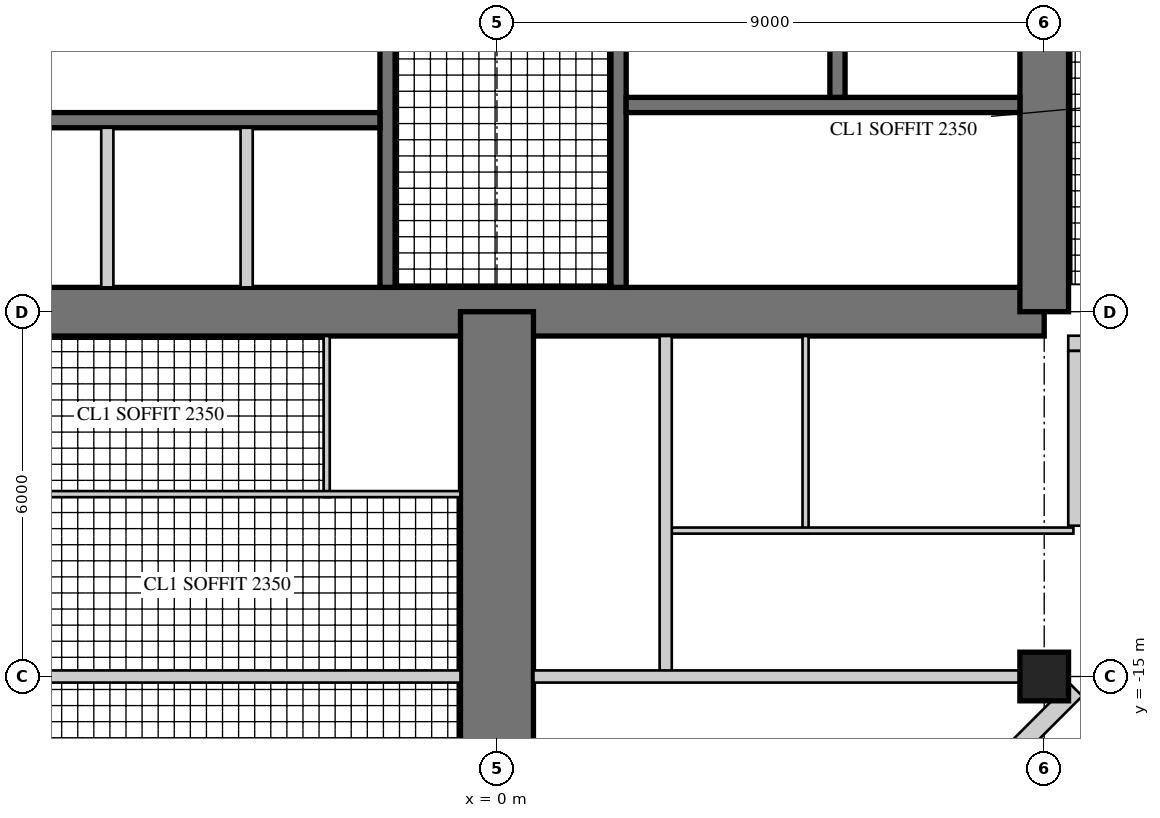
"""IFC4 building model, lengths in metres.
Left out: names, types, materials, properties, quantities, classifications, styles, units other than length and angle.
Written with IfcOpenShell. Run it as: python <this file> out.ifc"""

import sys

from ifc_helpers import new_model, si_unit, direction, frame, frame_2d, origin, origin_2d, place, context, subcontext, project, spatial, rectangle, hollow_rectangle, extrude, element, fill, save


model = new_model("IFC4")
c1 = context("Model", 3, precision=1e-05, world=origin(), true_north=direction((0.0, 1.0)))
c2 = subcontext(c1, "Body", "Model", "MODEL_VIEW")
j1 = project(units=[si_unit("LENGTHUNIT", "METRE"), si_unit("PLANEANGLEUNIT", "RADIAN")], contexts=[c1])
p1 = place(None, origin())
s1 = spatial("IfcSite", under=j1, at=p1, CompositionType="ELEMENT")
p2 = place(p1, origin())
s2 = spatial("IfcBuilding", under=s1, at=p2, CompositionType="ELEMENT")
p3 = place(p2, frame((0.0, 0.0, 235.7)))
s3 = spatial("IfcBuildingStorey", under=s2, at=p3, CompositionType="ELEMENT", Elevation=235.7)
p4 = place(p3, frame((-9.0, -9.0, 0.0), z_axis=(0.0, 0.0, 1.0), x_axis=(1.0, 0.0, 0.0)))
e1 = element("IfcWall", 1, at=p4, inside=s3, PredefinedType="SHEAR", context=c2, shape_type="SweptSolid", body=[
    extrude(rectangle(XDim=18.0, YDim=0.8, at=frame_2d((9.0, 0.0))), origin(), (0.0, 0.0, 1.0), 3.4),
])
p5 = place(p4, frame((9.8, 0.0, 0.0)))
e2 = element("IfcOpeningElement", 2, at=p5, cuts=e1, PredefinedType="OPENING", context=c2, shape_type="SweptSolid", body=[
    extrude(rectangle(XDim=1.0, YDim=2.4, at=frame_2d((0.5, 1.2))), frame((0.0, 0.41, 0.0), z_axis=(0.0, -1.0, 0.0), x_axis=(1.0, 0.0, 0.0)), (0.0, 0.0, 1.0), 0.82),
])
p6 = place(p3, frame((9.0, -9.0, 0.0), z_axis=(0.0, 0.0, 1.0), x_axis=(0.0, 1.0, 0.0)))
e3 = element("IfcWall", 3, at=p6, inside=s3, PredefinedType="SHEAR", context=c2, shape_type="SweptSolid", body=[
    extrude(rectangle(XDim=18.0, YDim=0.8, at=frame_2d((9.0, 0.0))), origin(), (0.0, 0.0, 1.0), 3.4),
])
p7 = place(p6, frame((9.8, 0.0, 0.0)))
e4 = element("IfcOpeningElement", 4, at=p7, cuts=e3, PredefinedType="OPENING", context=c2, shape_type="SweptSolid", body=[
    extrude(rectangle(XDim=1.0, YDim=2.4, at=frame_2d((0.5, 1.2))), frame((0.0, 0.41, 0.0), z_axis=(0.0, -1.0, 0.0), x_axis=(1.0, 0.0, 0.0)), (0.0, 0.0, 1.0), 0.82),
])
p8 = place(p3, frame((-1.8, -1.875, 0.0), z_axis=(0.0, 0.0, 1.0), x_axis=(0.0, -1.0, 0.0)))
e5 = element("IfcWall", 5, at=p8, inside=s3, PredefinedType="SHEAR", context=c2, shape_type="SweptSolid", body=[
    extrude(rectangle(XDim=6.725, YDim=0.25, at=frame_2d((3.363, 0.0))), origin(), (0.0, 0.0, 1.0), 3.4),
])
p9 = place(p8, frame((1.875, 0.0, 0.0)))
e6 = element("IfcOpeningElement", 6, at=p9, cuts=e5, PredefinedType="OPENING", context=c2, shape_type="SweptSolid", body=[
    extrude(rectangle(XDim=1.6, YDim=2.4, at=frame_2d((0.8, 1.2))), frame((0.0, 0.135, 0.0), z_axis=(0.0, -1.0, 0.0), x_axis=(1.0, 0.0, 0.0)), (0.0, 0.0, 1.0), 0.27),
])
p10 = place(p3, frame((-1.925, -5.85, 0.0), z_axis=(0.0, 0.0, 1.0), x_axis=(-1.0, 0.0, 0.0)))
e7 = element("IfcWall", 7, at=p10, inside=s3, PredefinedType="SHEAR", context=c2, shape_type="SweptSolid", body=[
    extrude(rectangle(XDim=6.675, YDim=0.25, at=frame_2d((3.337, 0.0))), origin(), (0.0, 0.0, 1.0), 3.4),
])
p11 = place(p10, frame((0.496, 0.0, 0.0)))
e8 = element("IfcOpeningElement", 8, at=p11, cuts=e7, PredefinedType="OPENING", context=c2, shape_type="SweptSolid", body=[
    extrude(rectangle(XDim=1.1, YDim=2.2, at=frame_2d((0.55, 1.1))), frame((0.0, 0.135, 0.0), z_axis=(0.0, -1.0, 0.0), x_axis=(1.0, 0.0, 0.0)), (0.0, 0.0, 1.0), 0.27),
])
p12 = place(p10, frame((2.788, 0.0, 0.0)))
e9 = element("IfcOpeningElement", 9, at=p12, cuts=e7, PredefinedType="OPENING", context=c2, shape_type="SweptSolid", body=[
    extrude(rectangle(XDim=1.1, YDim=2.2, at=frame_2d((0.55, 1.1))), frame((0.0, 0.135, 0.0), z_axis=(0.0, -1.0, 0.0), x_axis=(1.0, 0.0, 0.0)), (0.0, 0.0, 1.0), 0.27),
])
p13 = place(p10, frame((5.079, 0.0, 0.0)))
e10 = element("IfcOpeningElement", 10, at=p13, cuts=e7, PredefinedType="OPENING", context=c2, shape_type="SweptSolid", body=[
    extrude(rectangle(XDim=1.1, YDim=2.2, at=frame_2d((0.55, 1.1))), frame((0.0, 0.135, 0.0), z_axis=(0.0, -1.0, 0.0), x_axis=(1.0, 0.0, 0.0)), (0.0, 0.0, 1.0), 0.27),
])
for number, where, z_axis, x_axis in (
    (11, (-4.117, -5.975, 0.0), (0.0, 0.0, 1.0), (0.0, -1.0, 0.0)),
    (12, (-6.408, -5.975, 0.0), (0.0, 0.0, 1.0), (0.0, -1.0, 0.0)),
):
    element("IfcWall", number, at=place(p3, frame(where, z_axis=z_axis, x_axis=x_axis)), inside=s3, PredefinedType="PARTITIONING", context=c2, shape_type="SweptSolid", body=[
        extrude(rectangle(XDim=2.625, YDim=0.2, at=frame_2d((1.312, 0.0))), origin(), (0.0, 0.0, 1.0), 3.4),
    ])
p14 = place(p3, frame((2.0, -1.675, 0.0), z_axis=(0.0, 0.0, 1.0), x_axis=(0.0, -1.0, 0.0)))
e13 = element("IfcWall", 13, at=p14, inside=s3, PredefinedType="SHEAR", context=c2, shape_type="SweptSolid", body=[
    extrude(rectangle(XDim=6.925, YDim=0.25, at=frame_2d((3.462, 0.0))), origin(), (0.0, 0.0, 1.0), 3.4),
])
p15 = place(p14, frame((0.725, 0.0, 0.0)))
e14 = element("IfcOpeningElement", 14, at=p15, cuts=e13, PredefinedType="OPENING", context=c2, shape_type="SweptSolid", body=[
    extrude(rectangle(XDim=1.0, YDim=2.1, at=frame_2d((0.5, 1.05))), frame((0.0, 0.135, 0.0), z_axis=(0.0, -1.0, 0.0), x_axis=(1.0, 0.0, 0.0)), (0.0, 0.0, 1.0), 0.27),
])
p16 = place(p3, frame((2.125, -5.6, 0.0), z_axis=(0.0, 0.0, 1.0), x_axis=(1.0, 0.0, 0.0)))
e15 = element("IfcWall", 15, at=p16, inside=s3, PredefinedType="SHEAR", context=c2, shape_type="SweptSolid", body=[
    extrude(rectangle(XDim=6.475, YDim=0.25, at=frame_2d((3.238, 0.0))), origin(), (0.0, 0.0, 1.0), 3.4),
])
p17 = place(p16, frame((0.175, 0.0, 0.0)))
e16 = element("IfcOpeningElement", 16, at=p17, cuts=e15, PredefinedType="OPENING", context=c2, shape_type="SweptSolid", body=[
    extrude(rectangle(XDim=1.0, YDim=2.1, at=frame_2d((0.5, 1.05))), frame((0.0, 0.135, 0.0), z_axis=(0.0, -1.0, 0.0), x_axis=(1.0, 0.0, 0.0)), (0.0, 0.0, 1.0), 0.27),
])
p18 = place(p3, frame((5.6, -1.925, 0.0), z_axis=(0.0, 0.0, 1.0), x_axis=(0.0, -1.0, 0.0)))
e17 = element("IfcWall", 17, at=p18, inside=s3, PredefinedType="SHEAR", context=c2, shape_type="SweptSolid", body=[
    extrude(rectangle(XDim=3.55, YDim=0.25, at=frame_2d((1.775, 0.0))), origin(), (0.0, 0.0, 1.0), 3.4),
])
p19 = place(p18, frame((1.525, 0.0, 0.0)))
e18 = element("IfcOpeningElement", 18, at=p19, cuts=e17, PredefinedType="OPENING", context=c2, shape_type="SweptSolid", body=[
    extrude(rectangle(XDim=1.1, YDim=2.2, at=frame_2d((0.55, 1.1))), frame((0.0, 0.135, 0.0), z_axis=(0.0, -1.0, 0.0), x_axis=(1.0, 0.0, 0.0)), (0.0, 0.0, 1.0), 0.27),
])
p20 = place(p18, frame((0.075, 0.0, 0.0)))
e19 = element("IfcOpeningElement", 19, at=p20, cuts=e17, PredefinedType="OPENING", context=c2, shape_type="SweptSolid", body=[
    extrude(rectangle(XDim=0.8, YDim=2.1, at=frame_2d((0.4, 1.05))), frame((0.0, 0.135, 0.0), z_axis=(0.0, -1.0, 0.0), x_axis=(1.0, 0.0, 0.0)), (0.0, 0.0, 1.0), 0.27),
])
p21 = place(p3, frame((0.0, -9.0, 0.0), z_axis=(0.0, 0.0, 1.0), x_axis=(0.0, -1.0, 0.0)))
e20 = element("IfcWall", 20, at=p21, inside=s3, PredefinedType="SHEAR", context=c2, shape_type="SweptSolid", body=[
    extrude(rectangle(XDim=9.0, YDim=1.2, at=frame_2d((4.5, 0.0))), origin(), (0.0, 0.0, 1.0), 3.4),
])
p22 = place(p21, frame((3.8, 0.0, 0.0)))
e21 = element("IfcOpeningElement", 21, at=p22, cuts=e20, PredefinedType="OPENING", context=c2, shape_type="SweptSolid", body=[
    extrude(rectangle(XDim=1.0, YDim=2.15, at=frame_2d((0.5, 1.075))), frame((0.0, 0.61, 0.0), z_axis=(0.0, -1.0, 0.0), x_axis=(1.0, 0.0, 0.0)), (0.0, 0.0, 1.0), 1.22),
])
p23 = place(p21, frame((7.0, 0.0, 0.0)))
e22 = element("IfcOpeningElement", 22, at=p23, cuts=e20, PredefinedType="OPENING", context=c2, shape_type="SweptSolid", body=[
    extrude(rectangle(XDim=1.0, YDim=2.2, at=frame_2d((0.5, 1.1))), frame((0.0, 0.61, 0.0), z_axis=(0.0, -1.0, 0.0), x_axis=(1.0, 0.0, 0.0)), (0.0, 0.0, 1.0), 1.22),
])
p24 = place(p3, frame((9.0, -15.0, 0.0), z_axis=(0.0, 0.0, 1.0), x_axis=(1.0, 0.0, 0.0)))
e23 = element("IfcColumn", 23, at=p24, inside=s3, PredefinedType="COLUMN", context=c2, shape_type="SweptSolid", body=[
    extrude(rectangle(XDim=0.8, YDim=0.8, at=origin_2d()), origin(), (0.0, 0.0, 1.0), 3.4),
])
p25 = place(p3, frame((9.395, -9.52, 0.0), z_axis=(0.0, 0.0, 1.0), x_axis=(1.0, 0.0, 0.0)))
e24 = element("IfcWall", 24, at=p25, inside=s3, PredefinedType="SOLIDWALL", context=c2, shape_type="SweptSolid", body=[
    extrude(rectangle(XDim=3.125, YDim=0.25, at=frame_2d((1.562, 0.0))), origin(), (0.0, 0.0, 1.0), 3.22),
])
p26 = place(p25, frame((0.6, 0.0, 0.0)))
e25 = element("IfcOpeningElement", 25, at=p26, cuts=e24, PredefinedType="OPENING", context=c2, shape_type="SweptSolid", body=[
    extrude(rectangle(XDim=1.0, YDim=2.2, at=frame_2d((0.5, 1.1))), frame((0.0, 0.135, 0.0), z_axis=(0.0, -1.0, 0.0), x_axis=(1.0, 0.0, 0.0)), (0.0, 0.0, 1.0), 0.27),
])
p27 = place(p3, frame((-9.52, -15.215, 0.0), z_axis=(0.0, 0.0, 1.0), x_axis=(0.707106781187, -0.707106781187, 0.0)))
e26 = element("IfcWall", 26, at=p27, inside=s3, PredefinedType="SOLIDWALL", context=c2, shape_type="SweptSolid", body=[
    extrude(rectangle(XDim=4.674, YDim=0.3, at=frame_2d((2.337, 0.0))), origin(), (0.0, 0.0, 1.0), 3.22),
])
p28 = place(p27, frame((1.887, 0.0, 0.3)))
e27 = element("IfcOpeningElement", 27, at=p28, cuts=e26, PredefinedType="OPENING", context=c2, shape_type="SweptSolid", body=[
    extrude(rectangle(XDim=0.9, YDim=2.4, at=frame_2d((0.45, 1.2))), frame((0.0, 0.16, 0.0), z_axis=(0.0, -1.0, 0.0), x_axis=(1.0, 0.0, 0.0)), (0.0, 0.0, 1.0), 0.32),
])
p29 = place(p3, frame((6.215, -18.52, 0.0), z_axis=(0.0, 0.0, 1.0), x_axis=(0.707106781187, 0.707106781187, 0.0)))
e28 = element("IfcWall", 28, at=p29, inside=s3, PredefinedType="SOLIDWALL", context=c2, shape_type="SweptSolid", body=[
    extrude(rectangle(XDim=4.674, YDim=0.3, at=frame_2d((2.337, 0.0))), origin(), (0.0, 0.0, 1.0), 3.22),
])
p30 = place(p29, frame((1.887, 0.0, 0.3)))
e29 = element("IfcOpeningElement", 29, at=p30, cuts=e28, PredefinedType="OPENING", context=c2, shape_type="SweptSolid", body=[
    extrude(rectangle(XDim=0.9, YDim=2.4, at=frame_2d((0.45, 1.2))), frame((0.0, 0.16, 0.0), z_axis=(0.0, -1.0, 0.0), x_axis=(1.0, 0.0, 0.0)), (0.0, 0.0, 1.0), 0.32),
])
p31 = place(p3, frame((9.52, -12.52, 0.0), z_axis=(0.0, 0.0, 1.0), x_axis=(0.0, 1.0, 0.0)))
e30 = element("IfcWall", 30, at=p31, inside=s3, PredefinedType="SOLIDWALL", context=c2, shape_type="SweptSolid", body=[
    extrude(rectangle(XDim=2.875, YDim=0.25, at=frame_2d((1.438, 0.0))), origin(), (0.0, 0.0, 1.0), 3.22),
])
p32 = place(p31, frame((0.6, 0.0, 0.0)))
e31 = element("IfcOpeningElement", 31, at=p32, cuts=e30, PredefinedType="OPENING", context=c2, shape_type="SweptSolid", body=[
    extrude(rectangle(XDim=1.0, YDim=2.2, at=frame_2d((0.5, 1.1))), frame((0.0, 0.135, 0.0), z_axis=(0.0, -1.0, 0.0), x_axis=(1.0, 0.0, 0.0)), (0.0, 0.0, 1.0), 0.27),
])
p33 = place(p3, frame((5.075, -9.4, 0.0), z_axis=(0.0, 0.0, 1.0), x_axis=(0.0, -1.0, 0.0)))
e32 = element("IfcWall", 32, at=p33, inside=s3, PredefinedType="PARTITIONING", context=c2, shape_type="SweptSolid", body=[
    extrude(rectangle(XDim=3.25, YDim=0.1, at=frame_2d((1.625, 0.0))), origin(), (0.0, 0.0, 1.0), 3.22),
])
p34 = place(p3, frame((2.875, -12.6, 0.0), z_axis=(0.0, 0.0, 1.0), x_axis=(1.0, 0.0, 0.0)))
e33 = element("IfcWall", 33, at=p34, inside=s3, PredefinedType="PARTITIONING", context=c2, shape_type="SweptSolid", body=[
    extrude(rectangle(XDim=6.605, YDim=0.1, at=frame_2d((3.302, 0.0))), origin(), (0.0, 0.0, 1.0), 3.22),
])
p35 = place(p34, frame((0.55, 0.0, 0.0)))
e34 = element("IfcOpeningElement", 34, at=p35, cuts=e33, PredefinedType="OPENING", context=c2, shape_type="SweptSolid", body=[
    extrude(rectangle(XDim=0.9, YDim=2.1, at=frame_2d((0.45, 1.05))), frame((0.0, 0.06, 0.0), z_axis=(0.0, -1.0, 0.0), x_axis=(1.0, 0.0, 0.0)), (0.0, 0.0, 1.0), 0.12),
])
p36 = place(p34, frame((2.65, 0.0, 0.0)))
e35 = element("IfcOpeningElement", 35, at=p36, cuts=e33, PredefinedType="OPENING", context=c2, shape_type="SweptSolid", body=[
    extrude(rectangle(XDim=0.9, YDim=2.1, at=frame_2d((0.45, 1.05))), frame((0.0, 0.06, 0.0), z_axis=(0.0, -1.0, 0.0), x_axis=(1.0, 0.0, 0.0)), (0.0, 0.0, 1.0), 0.12),
])
p37 = place(p3, frame((-2.8, -9.4, 0.0), z_axis=(0.0, 0.0, 1.0), x_axis=(0.0, -1.0, 0.0)))
e36 = element("IfcWall", 36, at=p37, inside=s3, PredefinedType="PARTITIONING", context=c2, shape_type="SweptSolid", body=[
    extrude(rectangle(XDim=2.65, YDim=0.1, at=frame_2d((1.325, 0.0))), origin(), (0.0, 0.0, 1.0), 3.22),
])
p38 = place(p3, frame((-9.395, -12.0, 0.0), z_axis=(0.0, 0.0, 1.0), x_axis=(1.0, 0.0, 0.0)))
e37 = element("IfcWall", 37, at=p38, inside=s3, PredefinedType="PARTITIONING", context=c2, shape_type="SweptSolid", body=[
    extrude(rectangle(XDim=8.795, YDim=0.1, at=frame_2d((4.397, 0.0))), origin(), (0.0, 0.0, 1.0), 3.22),
])
p39 = place(p38, frame((5.245, 0.0, 0.0)))
e38 = element("IfcOpeningElement", 38, at=p39, cuts=e37, PredefinedType="OPENING", context=c2, shape_type="SweptSolid", body=[
    extrude(rectangle(XDim=0.9, YDim=2.1, at=frame_2d((0.45, 1.05))), frame((0.0, 0.06, 0.0), z_axis=(0.0, -1.0, 0.0), x_axis=(1.0, 0.0, 0.0)), (0.0, 0.0, 1.0), 0.12),
])
p40 = place(p38, frame((7.345, 0.0, 0.0)))
e39 = element("IfcOpeningElement", 39, at=p40, cuts=e37, PredefinedType="OPENING", context=c2, shape_type="SweptSolid", body=[
    extrude(rectangle(XDim=0.9, YDim=2.1, at=frame_2d((0.45, 1.05))), frame((0.0, 0.06, 0.0), z_axis=(0.0, -1.0, 0.0), x_axis=(1.0, 0.0, 0.0)), (0.0, 0.0, 1.0), 0.12),
])
p41 = place(p3, frame((2.775, -9.4, 0.0), z_axis=(0.0, 0.0, 1.0), x_axis=(0.0, -1.0, 0.0)))
e40 = element("IfcWall", 40, at=p41, inside=s3, PredefinedType="SOLIDWALL", context=c2, shape_type="SweptSolid", body=[
    extrude(rectangle(XDim=5.6, YDim=0.2, at=frame_2d((2.8, 0.0))), origin(), (0.0, 0.0, 1.0), 3.22),
])
p42 = place(p41, frame((3.75, 0.0, 0.0)))
e41 = element("IfcOpeningElement", 41, at=p42, cuts=e40, PredefinedType="OPENING", context=c2, shape_type="SweptSolid", body=[
    extrude(rectangle(XDim=1.0, YDim=2.15, at=frame_2d((0.5, 1.075))), frame((0.0, 0.11, 0.0), z_axis=(0.0, -1.0, 0.0), x_axis=(1.0, 0.0, 0.0)), (0.0, 0.0, 1.0), 0.22),
])
p43 = place(p3, frame((-8.6, -15.0, 0.0), z_axis=(0.0, 0.0, 1.0), x_axis=(1.0, 0.0, 0.0)))
e42 = element("IfcWall", 42, at=p43, inside=s3, PredefinedType="SOLIDWALL", context=c2, shape_type="SweptSolid", body=[
    extrude(rectangle(XDim=8.0, YDim=0.2, at=frame_2d((4.0, 0.0))), origin(), (0.0, 0.0, 1.0), 2.52),
])
p44 = place(p3, frame((0.6, -15.0, 0.0), z_axis=(0.0, 0.0, 1.0), x_axis=(1.0, 0.0, 0.0)))
e43 = element("IfcWall", 43, at=p44, inside=s3, PredefinedType="SOLIDWALL", context=c2, shape_type="SweptSolid", body=[
    extrude(rectangle(XDim=8.0, YDim=0.2, at=frame_2d((4.0, 0.0))), origin(), (0.0, 0.0, 1.0), 2.52),
])
p45 = place(p44, frame((0.35, 0.0, 0.0)))
e44 = element("IfcOpeningElement", 44, at=p45, cuts=e43, PredefinedType="OPENING", context=c2, shape_type="SweptSolid", body=[
    extrude(rectangle(XDim=1.0, YDim=2.2, at=frame_2d((0.5, 1.1))), frame((0.0, 0.11, 0.0), z_axis=(0.0, -1.0, 0.0), x_axis=(1.0, 0.0, 0.0)), (0.0, 0.0, 1.0), 0.22),
])
p46 = place(p32, origin())
e45 = element("IfcDoor", 45, at=p46, inside=s3, OperationType="SINGLE_SWING_LEFT", PredefinedType="DOOR", context=c2, shape_type="SweptSolid", body=[
    extrude(hollow_rectangle(XDim=1.0, YDim=2.2, WallThickness=0.06, at=frame_2d((0.5, 1.1))), frame((0.0, 0.025, 0.0), z_axis=(0.0, -1.0, 0.0), x_axis=(1.0, 0.0, 0.0)), (0.0, 0.0, 1.0), 0.05),
    extrude(rectangle(XDim=0.879, YDim=2.079, at=frame_2d((0.5, 1.1))), frame((0.0, 0.025, 0.0), z_axis=(0.0, -1.0, 0.0), x_axis=(1.0, 0.0, 0.0)), (0.0, 0.0, 1.0), 0.05),
])
fill(e31, e45)
p47 = place(p35, origin())
e46 = element("IfcDoor", 46, at=p47, inside=s3, OperationType="SINGLE_SWING_LEFT", PredefinedType="DOOR", context=c2, shape_type="SweptSolid", body=[
    extrude(rectangle(XDim=0.9, YDim=2.1, at=frame_2d((0.45, 1.05))), frame((0.0, 0.025, 0.0), z_axis=(0.0, -1.0, 0.0), x_axis=(1.0, 0.0, 0.0)), (0.0, 0.0, 1.0), 0.05),
])
fill(e34, e46)
p48 = place(p36, origin())
e47 = element("IfcDoor", 47, at=p48, inside=s3, OperationType="SINGLE_SWING_LEFT", PredefinedType="DOOR", context=c2, shape_type="SweptSolid", body=[
    extrude(rectangle(XDim=0.9, YDim=2.1, at=frame_2d((0.45, 1.05))), frame((0.0, 0.025, 0.0), z_axis=(0.0, -1.0, 0.0), x_axis=(1.0, 0.0, 0.0)), (0.0, 0.0, 1.0), 0.05),
])
fill(e35, e47)
p49 = place(p39, origin())
e48 = element("IfcDoor", 48, at=p49, inside=s3, OperationType="SINGLE_SWING_RIGHT", PredefinedType="DOOR", context=c2, shape_type="SweptSolid", body=[
    extrude(rectangle(XDim=0.9, YDim=2.1, at=frame_2d((0.45, 1.05))), frame((0.0, 0.025, 0.0), z_axis=(0.0, -1.0, 0.0), x_axis=(1.0, 0.0, 0.0)), (0.0, 0.0, 1.0), 0.05),
])
fill(e38, e48)
p50 = place(p40, origin())
e49 = element("IfcDoor", 49, at=p50, inside=s3, OperationType="SINGLE_SWING_RIGHT", PredefinedType="DOOR", context=c2, shape_type="SweptSolid", body=[
    extrude(rectangle(XDim=0.9, YDim=2.1, at=frame_2d((0.45, 1.05))), frame((0.0, 0.025, 0.0), z_axis=(0.0, -1.0, 0.0), x_axis=(1.0, 0.0, 0.0)), (0.0, 0.0, 1.0), 0.05),
])
fill(e39, e49)
p51 = place(p42, origin())
e50 = element("IfcDoor", 50, at=p51, inside=s3, OperationType="SINGLE_SWING_LEFT", PredefinedType="DOOR", context=c2, shape_type="SweptSolid", body=[
    extrude(rectangle(XDim=1.0, YDim=2.15, at=frame_2d((0.5, 1.075))), frame((0.0, 0.025, 0.0), z_axis=(0.0, -1.0, 0.0), x_axis=(1.0, 0.0, 0.0)), (0.0, 0.0, 1.0), 0.05),
])
fill(e41, e50)
p52 = place(p45, frame((1.0, 0.0, 0.0), z_axis=(0.0, 0.0, 1.0), x_axis=(-1.0, 0.0, 0.0)))
e51 = element("IfcDoor", 51, at=p52, inside=s3, OperationType="SINGLE_SWING_LEFT", PredefinedType="DOOR", context=c2, shape_type="SweptSolid", body=[
    extrude(rectangle(XDim=1.0, YDim=2.2, at=frame_2d((0.5, 1.1))), frame((0.0, 0.025, 0.0), z_axis=(0.0, -1.0, 0.0), x_axis=(1.0, 0.0, 0.0)), (0.0, 0.0, 1.0), 0.05),
])
fill(e44, e51)
p53 = place(p22, frame((1.0, 0.0, 0.0), z_axis=(0.0, 0.0, 1.0), x_axis=(-1.0, 0.0, 0.0)))
e52 = element("IfcDoor", 52, at=p53, inside=s3, OperationType="SINGLE_SWING_RIGHT", PredefinedType="DOOR", context=c2, shape_type="SweptSolid", body=[
    extrude(rectangle(XDim=1.0, YDim=2.15, at=frame_2d((0.5, 1.075))), frame((0.0, 0.025, 0.0), z_axis=(0.0, -1.0, 0.0), x_axis=(1.0, 0.0, 0.0)), (0.0, 0.0, 1.0), 0.05),
])
fill(e21, e52)
p54 = place(p5, origin())
e53 = element("IfcDoor", 53, at=p54, inside=s3, OperationType="SINGLE_SWING_RIGHT", PredefinedType="DOOR", context=c2, shape_type="SweptSolid", body=[
    extrude(rectangle(XDim=1.0, YDim=2.4, at=frame_2d((0.5, 1.2))), frame((0.0, 0.055, 0.0), z_axis=(0.0, -1.0, 0.0), x_axis=(1.0, 0.0, 0.0)), (0.0, 0.0, 1.0), 0.05),
])
fill(e2, e53)
p55 = place(p11, origin())
e54 = element("IfcDoor", 54, at=p55, inside=s3, OperationType="DOUBLE_DOOR_SLIDING", PredefinedType="DOOR", context=c2, shape_type="SweptSolid", body=[
    extrude(rectangle(XDim=1.1, YDim=2.2, at=frame_2d((0.55, 1.1))), frame((0.0, 0.025, 0.0), z_axis=(0.0, -1.0, 0.0), x_axis=(1.0, 0.0, 0.0)), (0.0, 0.0, 1.0), 0.05),
])
fill(e8, e54)
p56 = place(p12, origin())
e55 = element("IfcDoor", 55, at=p56, inside=s3, OperationType="DOUBLE_DOOR_SLIDING", PredefinedType="DOOR", context=c2, shape_type="SweptSolid", body=[
    extrude(rectangle(XDim=1.1, YDim=2.2, at=frame_2d((0.55, 1.1))), frame((0.0, 0.025, 0.0), z_axis=(0.0, -1.0, 0.0), x_axis=(1.0, 0.0, 0.0)), (0.0, 0.0, 1.0), 0.05),
])
fill(e9, e55)
p57 = place(p13, origin())
e56 = element("IfcDoor", 56, at=p57, inside=s3, OperationType="DOUBLE_DOOR_SLIDING", PredefinedType="DOOR", context=c2, shape_type="SweptSolid", body=[
    extrude(rectangle(XDim=1.1, YDim=2.2, at=frame_2d((0.55, 1.1))), frame((0.0, 0.025, 0.0), z_axis=(0.0, -1.0, 0.0), x_axis=(1.0, 0.0, 0.0)), (0.0, 0.0, 1.0), 0.05),
])
fill(e10, e56)
p58 = place(p9, origin())
e57 = element("IfcDoor", 57, at=p58, inside=s3, OperationType="DOUBLE_DOOR_DOUBLE_SWING", PredefinedType="DOOR", context=c2, shape_type="SweptSolid", body=[
    extrude(rectangle(XDim=1.6, YDim=2.4, at=frame_2d((0.8, 1.2))), frame((0.0, 0.025, 0.0), z_axis=(0.0, -1.0, 0.0), x_axis=(1.0, 0.0, 0.0)), (0.0, 0.0, 1.0), 0.05),
])
fill(e6, e57)
p59 = place(p17, frame((1.0, 0.0, 0.0), z_axis=(0.0, 0.0, 1.0), x_axis=(-1.0, 0.0, 0.0)))
e58 = element("IfcDoor", 58, at=p59, inside=s3, OperationType="SINGLE_SWING_RIGHT", PredefinedType="DOOR", context=c2, shape_type="SweptSolid", body=[
    extrude(rectangle(XDim=1.0, YDim=2.1, at=frame_2d((0.5, 1.05))), frame((0.0, 0.025, 0.0), z_axis=(0.0, -1.0, 0.0), x_axis=(1.0, 0.0, 0.0)), (0.0, 0.0, 1.0), 0.05),
])
fill(e16, e58)
save(model, sys.argv[1])
